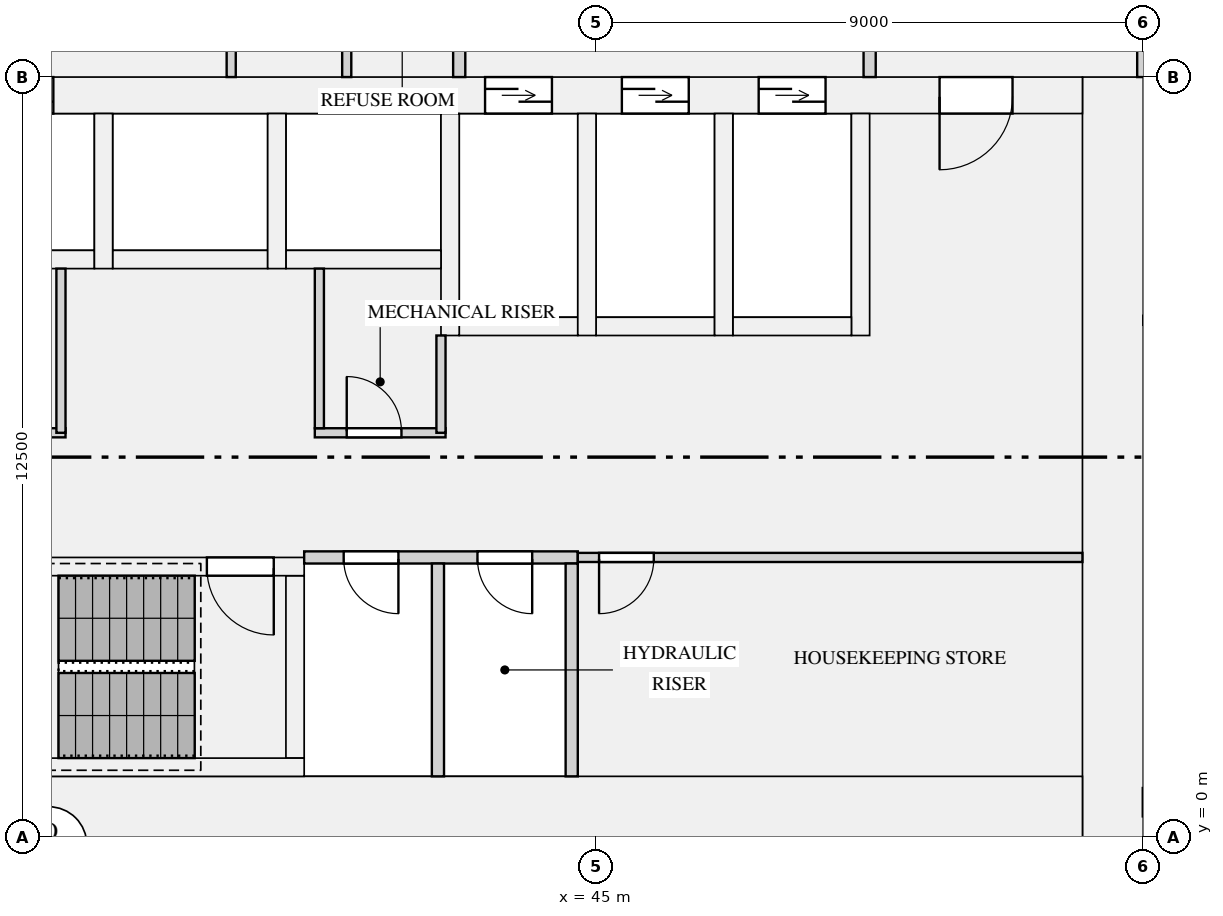
"""IFC4 building model, lengths in metres.
Left out: names, types, materials, properties, quantities, classifications, styles, units other than length and angle.
Written with IfcOpenShell. Run it as: python <this file> out.ifc"""

import sys

from ifc_helpers import new_model, si_unit, direction, frame, frame_2d, origin, place, context, subcontext, project, spatial, rectangle, extrude, element, fill, save


model = new_model("IFC4")
c1 = context("Model", 3, precision=1e-05, world=origin(), true_north=direction((0.0, 1.0)))
c2 = subcontext(c1, "Body", "Model", "MODEL_VIEW")
j1 = project(units=[si_unit("LENGTHUNIT", "METRE"), si_unit("PLANEANGLEUNIT", "RADIAN")], contexts=[c1])
p1 = place(None, origin())
s1 = spatial("IfcSite", under=j1, at=p1, CompositionType="ELEMENT")
p2 = place(p1, origin())
s2 = spatial("IfcBuilding", under=s1, at=p2, CompositionType="ELEMENT")
p3 = place(p2, frame((0.0, 0.0, 54.15)))
s3 = spatial("IfcBuildingStorey", under=s2, at=p3, CompositionType="ELEMENT", Elevation=54.15)
p4 = place(p3, frame((53.5, 0.0, 0.0), z_axis=(0.0, 0.0, 1.0), x_axis=(0.0, 1.0, 0.0)))
e1 = element("IfcWall", 1, at=p4, inside=s3, PredefinedType="SHEAR", context=c2, shape_type="SweptSolid", body=[
    extrude(rectangle(XDim=12.5, YDim=1.0, at=frame_2d((6.25, 0.0))), origin(), (0.0, 0.0, 1.0), 3.15),
])
p5 = place(p3, frame((19.0, 0.5, 0.0), z_axis=(0.0, 0.0, 1.0), x_axis=(1.0, 0.0, 0.0)))
e2 = element("IfcWall", 2, at=p5, inside=s3, PredefinedType="SHEAR", context=c2, shape_type="SweptSolid", body=[
    extrude(rectangle(XDim=34.0, YDim=1.0, at=frame_2d((17.0, 0.0))), origin(), (0.0, 0.0, 1.0), 3.15),
])
p6 = place(p3, frame((19.0, 12.2, 0.0), z_axis=(0.0, 0.0, 1.0), x_axis=(1.0, 0.0, 0.0)))
e3 = element("IfcWall", 3, at=p6, inside=s3, PredefinedType="SHEAR", context=c2, shape_type="SweptSolid", body=[
    extrude(rectangle(XDim=34.0, YDim=0.6, at=frame_2d((17.0, 0.0))), origin(), (0.0, 0.0, 1.0), 3.15),
])
p7 = place(p6, frame((4.475, 0.0, 0.0)))
e4 = element("IfcOpeningElement", 4, at=p7, cuts=e3, PredefinedType="OPENING", context=c2, shape_type="SweptSolid", body=[
    extrude(rectangle(XDim=1.2, YDim=2.1, at=frame_2d((0.6, 1.05))), frame((0.0, 0.31, 0.0), z_axis=(0.0, -1.0, 0.0), x_axis=(1.0, 0.0, 0.0)), (0.0, 0.0, 1.0), 0.62),
])
p8 = place(p6, frame((7.325, 0.0, 0.0)))
e5 = element("IfcOpeningElement", 5, at=p8, cuts=e3, PredefinedType="OPENING", context=c2, shape_type="SweptSolid", body=[
    extrude(rectangle(XDim=1.2, YDim=2.1, at=frame_2d((0.6, 1.05))), frame((0.0, 0.31, 0.0), z_axis=(0.0, -1.0, 0.0), x_axis=(1.0, 0.0, 0.0)), (0.0, 0.0, 1.0), 0.62),
])
p9 = place(p6, frame((10.175, 0.0, 0.0)))
e6 = element("IfcOpeningElement", 6, at=p9, cuts=e3, PredefinedType="OPENING", context=c2, shape_type="SweptSolid", body=[
    extrude(rectangle(XDim=1.2, YDim=2.1, at=frame_2d((0.6, 1.05))), frame((0.0, 0.31, 0.0), z_axis=(0.0, -1.0, 0.0), x_axis=(1.0, 0.0, 0.0)), (0.0, 0.0, 1.0), 0.62),
])
p10 = place(p6, frame((13.025, 0.0, 0.0)))
e7 = element("IfcOpeningElement", 7, at=p10, cuts=e3, PredefinedType="OPENING", context=c2, shape_type="SweptSolid", body=[
    extrude(rectangle(XDim=1.2, YDim=2.1, at=frame_2d((0.6, 1.05))), frame((0.0, 0.31, 0.0), z_axis=(0.0, -1.0, 0.0), x_axis=(1.0, 0.0, 0.0)), (0.0, 0.0, 1.0), 0.62),
])
p11 = place(p6, frame((15.875, 0.0, 0.0)))
e8 = element("IfcOpeningElement", 8, at=p11, cuts=e3, PredefinedType="OPENING", context=c2, shape_type="SweptSolid", body=[
    extrude(rectangle(XDim=1.2, YDim=2.1, at=frame_2d((0.6, 1.05))), frame((0.0, 0.31, 0.0), z_axis=(0.0, -1.0, 0.0), x_axis=(1.0, 0.0, 0.0)), (0.0, 0.0, 1.0), 0.62),
])
p12 = place(p6, frame((24.175, 0.0, 0.0)))
e9 = element("IfcOpeningElement", 9, at=p12, cuts=e3, PredefinedType="OPENING", context=c2, shape_type="SweptSolid", body=[
    extrude(rectangle(XDim=1.1, YDim=2.1, at=frame_2d((0.55, 1.05))), frame((0.0, 0.31, 0.0), z_axis=(0.0, -1.0, 0.0), x_axis=(1.0, 0.0, 0.0)), (0.0, 0.0, 1.0), 0.62),
])
p13 = place(p6, frame((26.425, 0.0, 0.0)))
e10 = element("IfcOpeningElement", 10, at=p13, cuts=e3, PredefinedType="OPENING", context=c2, shape_type="SweptSolid", body=[
    extrude(rectangle(XDim=1.1, YDim=2.1, at=frame_2d((0.55, 1.05))), frame((0.0, 0.31, 0.0), z_axis=(0.0, -1.0, 0.0), x_axis=(1.0, 0.0, 0.0)), (0.0, 0.0, 1.0), 0.62),
])
p14 = place(p6, frame((28.675, 0.0, 0.0)))
e11 = element("IfcOpeningElement", 11, at=p14, cuts=e3, PredefinedType="OPENING", context=c2, shape_type="SweptSolid", body=[
    extrude(rectangle(XDim=1.1, YDim=2.1, at=frame_2d((0.55, 1.05))), frame((0.0, 0.31, 0.0), z_axis=(0.0, -1.0, 0.0), x_axis=(1.0, 0.0, 0.0)), (0.0, 0.0, 1.0), 0.62),
])
p15 = place(p6, frame((1.15, 0.0, 0.0)))
e12 = element("IfcOpeningElement", 12, at=p15, cuts=e3, PredefinedType="OPENING", context=c2, shape_type="SweptSolid", body=[
    extrude(rectangle(XDim=1.2, YDim=2.1, at=frame_2d((0.6, 1.05))), frame((0.0, 0.31, 0.0), z_axis=(0.0, -1.0, 0.0), x_axis=(1.0, 0.0, 0.0)), (0.0, 0.0, 1.0), 0.62),
])
p16 = place(p6, frame((31.65, 0.0, 0.0)))
e13 = element("IfcOpeningElement", 13, at=p16, cuts=e3, PredefinedType="OPENING", context=c2, shape_type="SweptSolid", body=[
    extrude(rectangle(XDim=1.2, YDim=2.1, at=frame_2d((0.6, 1.05))), frame((0.0, 0.31, 0.0), z_axis=(0.0, -1.0, 0.0), x_axis=(1.0, 0.0, 0.0)), (0.0, 0.0, 1.0), 0.62),
])
for number, where, z_axis, x_axis in (
    (14, (34.2, 9.5, 0.0), (0.0, 0.0, 1.0), (1.0, 0.0, 0.0)),
    (15, (37.05, 9.5, 0.0), (0.0, 0.0, 1.0), (1.0, 0.0, 0.0)),
):
    element("IfcWall", number, at=place(p3, frame(where, z_axis=z_axis, x_axis=x_axis)), inside=s3, PredefinedType="SHEAR", context=c2, shape_type="SweptSolid", body=[
        extrude(rectangle(XDim=2.55, YDim=0.3, at=frame_2d((1.275, 0.0))), origin(), (0.0, 0.0, 1.0), 3.15),
    ])
p17 = place(p3, frame((36.9, 9.35, 0.0), z_axis=(0.0, 0.0, 1.0), x_axis=(0.0, 1.0, 0.0)))
e16 = element("IfcWall", 16, at=p17, inside=s3, PredefinedType="SHEAR", context=c2, shape_type="SweptSolid", body=[
    extrude(rectangle(XDim=2.55, YDim=0.3, at=frame_2d((1.275, 0.0))), origin(), (0.0, 0.0, 1.0), 3.15),
])
p18 = place(p3, frame((39.9, 9.5, 0.0), z_axis=(0.0, 0.0, 1.0), x_axis=(1.0, 0.0, 0.0)))
e17 = element("IfcWall", 17, at=p18, inside=s3, PredefinedType="SHEAR", context=c2, shape_type="SweptSolid", body=[
    extrude(rectangle(XDim=2.55, YDim=0.3, at=frame_2d((1.275, 0.0))), origin(), (0.0, 0.0, 1.0), 3.15),
])
p19 = place(p3, frame((39.75, 9.35, 0.0), z_axis=(0.0, 0.0, 1.0), x_axis=(0.0, 1.0, 0.0)))
e18 = element("IfcWall", 18, at=p19, inside=s3, PredefinedType="SHEAR", context=c2, shape_type="SweptSolid", body=[
    extrude(rectangle(XDim=2.55, YDim=0.3, at=frame_2d((1.275, 0.0))), origin(), (0.0, 0.0, 1.0), 3.15),
])
p20 = place(p3, frame((42.75, 8.4, 0.0), z_axis=(0.0, 0.0, 1.0), x_axis=(1.0, 0.0, 0.0)))
e19 = element("IfcWall", 19, at=p20, inside=s3, PredefinedType="SHEAR", context=c2, shape_type="SweptSolid", body=[
    extrude(rectangle(XDim=1.95, YDim=0.3, at=frame_2d((0.975, 0.0))), origin(), (0.0, 0.0, 1.0), 3.15),
])
p21 = place(p3, frame((42.6, 8.25, 0.0), z_axis=(0.0, 0.0, 1.0), x_axis=(0.0, 1.0, 0.0)))
e20 = element("IfcWall", 20, at=p21, inside=s3, PredefinedType="SHEAR", context=c2, shape_type="SweptSolid", body=[
    extrude(rectangle(XDim=3.65, YDim=0.3, at=frame_2d((1.825, 0.0))), origin(), (0.0, 0.0, 1.0), 3.15),
])
p22 = place(p3, frame((45.0, 8.4, 0.0), z_axis=(0.0, 0.0, 1.0), x_axis=(1.0, 0.0, 0.0)))
e21 = element("IfcWall", 21, at=p22, inside=s3, PredefinedType="SHEAR", context=c2, shape_type="SweptSolid", body=[
    extrude(rectangle(XDim=1.95, YDim=0.3, at=frame_2d((0.975, 0.0))), origin(), (0.0, 0.0, 1.0), 3.15),
])
p23 = place(p3, frame((44.85, 8.25, 0.0), z_axis=(0.0, 0.0, 1.0), x_axis=(0.0, 1.0, 0.0)))
e22 = element("IfcWall", 22, at=p23, inside=s3, PredefinedType="SHEAR", context=c2, shape_type="SweptSolid", body=[
    extrude(rectangle(XDim=3.65, YDim=0.3, at=frame_2d((1.825, 0.0))), origin(), (0.0, 0.0, 1.0), 3.15),
])
p24 = place(p3, frame((47.25, 8.4, 0.0), z_axis=(0.0, 0.0, 1.0), x_axis=(1.0, 0.0, 0.0)))
e23 = element("IfcWall", 23, at=p24, inside=s3, PredefinedType="SHEAR", context=c2, shape_type="SweptSolid", body=[
    extrude(rectangle(XDim=1.95, YDim=0.3, at=frame_2d((0.975, 0.0))), origin(), (0.0, 0.0, 1.0), 3.15),
])
for number, where, z_axis, x_axis in (
    (24, (47.1, 8.25, 0.0), (0.0, 0.0, 1.0), (0.0, 1.0, 0.0)),
    (25, (49.35, 8.25, 0.0), (0.0, 0.0, 1.0), (0.0, 1.0, 0.0)),
):
    element("IfcWall", number, at=place(p3, frame(where, z_axis=z_axis, x_axis=x_axis)), inside=s3, PredefinedType="SHEAR", context=c2, shape_type="SweptSolid", body=[
        extrude(rectangle(XDim=3.65, YDim=0.3, at=frame_2d((1.825, 0.0))), origin(), (0.0, 0.0, 1.0), 3.15),
    ])
p25 = place(p3, frame((31.8, 1.15, 0.0), z_axis=(0.0, 0.0, 1.0), x_axis=(1.0, 0.0, 0.0)))
e26 = element("IfcWall", 26, at=p25, inside=s3, PredefinedType="SHEAR", context=c2, shape_type="SweptSolid", body=[
    extrude(rectangle(XDim=8.4, YDim=0.3, at=frame_2d((4.2, 0.0))), origin(), (0.0, 0.0, 1.0), 3.15),
])
p26 = place(p3, frame((31.8, 4.45, 0.0), z_axis=(0.0, 0.0, 1.0), x_axis=(1.0, 0.0, 0.0)))
e27 = element("IfcWall", 27, at=p26, inside=s3, PredefinedType="SHEAR", context=c2, shape_type="SweptSolid", body=[
    extrude(rectangle(XDim=8.4, YDim=0.3, at=frame_2d((4.2, 0.0))), origin(), (0.0, 0.0, 1.0), 3.15),
])
p27 = place(p26, frame((6.8, 0.0, 0.0)))
e28 = element("IfcOpeningElement", 28, at=p27, cuts=e27, PredefinedType="OPENING", context=c2, shape_type="SweptSolid", body=[
    extrude(rectangle(XDim=1.1, YDim=2.1, at=frame_2d((0.55, 1.05))), frame((0.0, 0.16, 0.0), z_axis=(0.0, -1.0, 0.0), x_axis=(1.0, 0.0, 0.0)), (0.0, 0.0, 1.0), 0.32),
])
p28 = place(p3, frame((40.05, 1.3, 0.0), z_axis=(0.0, 0.0, 1.0), x_axis=(0.0, 1.0, 0.0)))
e29 = element("IfcWall", 29, at=p28, inside=s3, PredefinedType="SHEAR", context=c2, shape_type="SweptSolid", body=[
    extrude(rectangle(XDim=3.0, YDim=0.3, at=frame_2d((1.5, 0.0))), origin(), (0.0, 0.0, 1.0), 3.15),
])
p29 = place(p3, frame((40.2, 4.6, 0.0), z_axis=(0.0, 0.0, 1.0), x_axis=(1.0, 0.0, 0.0)))
e30 = element("IfcWall", 30, at=p29, inside=s3, PredefinedType="PARTITIONING", context=c2, shape_type="SweptSolid", body=[
    extrude(rectangle(XDim=4.5, YDim=0.2, at=frame_2d((2.25, 0.0))), origin(), (0.0, 0.0, 1.0), 2.83),
])
p30 = place(p29, frame((0.65, 0.0, 0.0)))
e31 = element("IfcOpeningElement", 31, at=p30, cuts=e30, PredefinedType="OPENING", context=c2, shape_type="SweptSolid", body=[
    extrude(rectangle(XDim=0.9, YDim=2.1, at=frame_2d((0.45, 1.05))), frame((0.0, 0.11, 0.0), z_axis=(0.0, -1.0, 0.0), x_axis=(1.0, 0.0, 0.0)), (0.0, 0.0, 1.0), 0.22),
])
p31 = place(p29, frame((2.85, 0.0, 0.0)))
e32 = element("IfcOpeningElement", 32, at=p31, cuts=e30, PredefinedType="OPENING", context=c2, shape_type="SweptSolid", body=[
    extrude(rectangle(XDim=0.9, YDim=2.1, at=frame_2d((0.45, 1.05))), frame((0.0, 0.11, 0.0), z_axis=(0.0, -1.0, 0.0), x_axis=(1.0, 0.0, 0.0)), (0.0, 0.0, 1.0), 0.22),
])
p32 = place(p3, frame((44.7, 4.6, 0.0), z_axis=(0.0, 0.0, 1.0), x_axis=(1.0, 0.0, 0.0)))
e33 = element("IfcWall", 33, at=p32, inside=s3, PredefinedType="PARTITIONING", context=c2, shape_type="SweptSolid", body=[
    extrude(rectangle(XDim=8.3, YDim=0.15, at=frame_2d((4.15, 0.0))), origin(), (0.0, 0.0, 1.0), 2.83),
])
p33 = place(p32, frame((0.35, 0.0, 0.0)))
e34 = element("IfcOpeningElement", 34, at=p33, cuts=e33, PredefinedType="OPENING", context=c2, shape_type="SweptSolid", body=[
    extrude(rectangle(XDim=0.9, YDim=2.1, at=frame_2d((0.45, 1.05))), frame((0.0, 0.085, 0.0), z_axis=(0.0, -1.0, 0.0), x_axis=(1.0, 0.0, 0.0)), (0.0, 0.0, 1.0), 0.17),
])
p34 = place(p3, frame((27.625, 6.65, 0.0), z_axis=(0.0, 0.0, 1.0), x_axis=(1.0, 0.0, 0.0)))
e35 = element("IfcWall", 35, at=p34, inside=s3, PredefinedType="PARTITIONING", context=c2, shape_type="SweptSolid", body=[
    extrude(rectangle(XDim=8.65, YDim=0.15, at=frame_2d((4.325, 0.0))), origin(), (0.0, 0.0, 1.0), 2.83),
])
p35 = place(p34, frame((0.525, 0.0, 0.0)))
e36 = element("IfcOpeningElement", 36, at=p35, cuts=e35, PredefinedType="OPENING", context=c2, shape_type="SweptSolid", body=[
    extrude(rectangle(XDim=0.9, YDim=2.1, at=frame_2d((0.45, 1.05))), frame((0.0, 0.085, 0.0), z_axis=(0.0, -1.0, 0.0), x_axis=(1.0, 0.0, 0.0)), (0.0, 0.0, 1.0), 0.17),
])
p36 = place(p34, frame((5.525, 0.0, 0.0)))
e37 = element("IfcOpeningElement", 37, at=p36, cuts=e35, PredefinedType="OPENING", context=c2, shape_type="SweptSolid", body=[
    extrude(rectangle(XDim=0.9, YDim=2.1, at=frame_2d((0.45, 1.05))), frame((0.0, 0.085, 0.0), z_axis=(0.0, -1.0, 0.0), x_axis=(1.0, 0.0, 0.0)), (0.0, 0.0, 1.0), 0.17),
])
p37 = place(p3, frame((40.375, 6.65, 0.0), z_axis=(0.0, 0.0, 1.0), x_axis=(1.0, 0.0, 0.0)))
e38 = element("IfcWall", 38, at=p37, inside=s3, PredefinedType="PARTITIONING", context=c2, shape_type="SweptSolid", body=[
    extrude(rectangle(XDim=2.15, YDim=0.15, at=frame_2d((1.075, 0.0))), origin(), (0.0, 0.0, 1.0), 2.83),
])
p38 = place(p37, frame((0.525, 0.0, 0.0)))
e39 = element("IfcOpeningElement", 39, at=p38, cuts=e38, PredefinedType="OPENING", context=c2, shape_type="SweptSolid", body=[
    extrude(rectangle(XDim=0.9, YDim=2.1, at=frame_2d((0.45, 1.05))), frame((0.0, 0.085, 0.0), z_axis=(0.0, -1.0, 0.0), x_axis=(1.0, 0.0, 0.0)), (0.0, 0.0, 1.0), 0.17),
])
for number, where, z_axis, x_axis in (
    (40, (42.4, 1.0, 0.0), (0.0, 0.0, 1.0), (0.0, 1.0, 0.0)),
    (41, (44.6, 1.0, 0.0), (0.0, 0.0, 1.0), (0.0, 1.0, 0.0)),
):
    element("IfcWall", number, at=place(p3, frame(where, z_axis=z_axis, x_axis=x_axis)), inside=s3, PredefinedType="PARTITIONING", context=c2, shape_type="SweptSolid", body=[
        extrude(rectangle(XDim=3.5, YDim=0.2, at=frame_2d((1.75, 0.0))), origin(), (0.0, 0.0, 1.0), 2.83),
    ])
p39 = place(p3, frame((36.2, 6.65, 0.0), z_axis=(0.0, 0.0, 1.0), x_axis=(0.0, 1.0, 0.0)))
e42 = element("IfcWall", 42, at=p39, inside=s3, PredefinedType="PARTITIONING", context=c2, shape_type="SweptSolid", body=[
    extrude(rectangle(XDim=2.7, YDim=0.15, at=frame_2d((1.35, 0.0))), origin(), (0.0, 0.0, 1.0), 2.83),
])
p40 = place(p3, frame((42.45, 6.65, 0.0), z_axis=(0.0, 0.0, 1.0), x_axis=(0.0, 1.0, 0.0)))
e43 = element("IfcWall", 43, at=p40, inside=s3, PredefinedType="PARTITIONING", context=c2, shape_type="SweptSolid", body=[
    extrude(rectangle(XDim=1.6, YDim=0.15, at=frame_2d((0.8, 0.0))), origin(), (0.0, 0.0, 1.0), 2.83),
])
p41 = place(p3, frame((40.45, 6.725, 0.0), z_axis=(0.0, 0.0, 1.0), x_axis=(0.0, 1.0, 0.0)))
e44 = element("IfcWall", 44, at=p41, inside=s3, PredefinedType="PARTITIONING", context=c2, shape_type="SweptSolid", body=[
    extrude(rectangle(XDim=2.625, YDim=0.15, at=frame_2d((1.312, 0.0))), origin(), (0.0, 0.0, 1.0), 2.83),
])
for number, where, z_axis, x_axis in (
    (45, (39.0, 12.5, 0.0), (0.0, 0.0, 1.0), (0.0, 1.0, 0.0)),
    (46, (40.9, 12.5, 0.0), (0.0, 0.0, 1.0), (0.0, 1.0, 0.0)),
):
    element("IfcWall", number, at=place(p3, frame(where, z_axis=z_axis, x_axis=x_axis)), inside=s3, PredefinedType="PARTITIONING", context=c2, shape_type="SweptSolid", body=[
        extrude(rectangle(XDim=1.925, YDim=0.15, at=frame_2d((0.962, 0.0))), origin(), (0.0, 0.0, 1.0), 2.83),
    ])
p42 = place(p3, frame((42.75, 12.5, 0.0), z_axis=(0.0, 0.0, 1.0), x_axis=(0.0, 1.0, 0.0)))
e47 = element("IfcWall", 47, at=p42, inside=s3, PredefinedType="PARTITIONING", context=c2, shape_type="SweptSolid", body=[
    extrude(rectangle(XDim=1.925, YDim=0.2, at=frame_2d((0.962, 0.0))), origin(), (0.0, 0.0, 1.0), 2.83),
])
p43 = place(p3, frame((49.5, 12.5, 0.0), z_axis=(0.0, 0.0, 1.0), x_axis=(0.0, 1.0, 0.0)))
e48 = element("IfcWall", 48, at=p43, inside=s3, PredefinedType="PARTITIONING", context=c2, shape_type="SweptSolid", body=[
    extrude(rectangle(XDim=3.4, YDim=0.2, at=frame_2d((1.7, 0.0))), origin(), (0.0, 0.0, 1.0), 2.83),
])
p44 = place(p43, frame((1.15, 0.0, 0.0)))
e49 = element("IfcOpeningElement", 49, at=p44, cuts=e48, PredefinedType="OPENING", context=c2, shape_type="SweptSolid", body=[
    extrude(rectangle(XDim=1.1, YDim=2.1, at=frame_2d((0.55, 1.05))), frame((0.0, 0.11, 0.0), z_axis=(0.0, -1.0, 0.0), x_axis=(1.0, 0.0, 0.0)), (0.0, 0.0, 1.0), 0.22),
])
p45 = place(p3, frame((54.0, 12.5, 0.0), z_axis=(0.0, 0.0, 1.0), x_axis=(0.0, 1.0, 0.0)))
e50 = element("IfcWall", 50, at=p45, inside=s3, PredefinedType="PARTITIONING", context=c2, shape_type="SweptSolid", body=[
    extrude(rectangle(XDim=3.4, YDim=0.2, at=frame_2d((1.7, 0.0))), origin(), (0.0, 0.0, 1.0), 2.83),
])
p46 = place(p11, origin())
e51 = element("IfcDoor", 51, at=p46, inside=s3, OperationType="DOUBLE_DOOR_SLIDING", PredefinedType="DOOR", context=c2, shape_type="SweptSolid", body=[
    extrude(rectangle(XDim=1.2, YDim=2.1, at=frame_2d((0.6, 1.05))), frame((0.0, 0.025, 0.0), z_axis=(0.0, -1.0, 0.0), x_axis=(1.0, 0.0, 0.0)), (0.0, 0.0, 1.0), 0.05),
])
fill(e8, e51)
p47 = place(p12, origin())
e52 = element("IfcDoor", 52, at=p47, inside=s3, OperationType="DOUBLE_DOOR_SLIDING", PredefinedType="DOOR", context=c2, shape_type="SweptSolid", body=[
    extrude(rectangle(XDim=1.1, YDim=2.1, at=frame_2d((0.55, 1.05))), frame((0.0, 0.025, 0.0), z_axis=(0.0, -1.0, 0.0), x_axis=(1.0, 0.0, 0.0)), (0.0, 0.0, 1.0), 0.05),
])
fill(e9, e52)
p48 = place(p13, origin())
e53 = element("IfcDoor", 53, at=p48, inside=s3, OperationType="DOUBLE_DOOR_SLIDING", PredefinedType="DOOR", context=c2, shape_type="SweptSolid", body=[
    extrude(rectangle(XDim=1.1, YDim=2.1, at=frame_2d((0.55, 1.05))), frame((0.0, 0.025, 0.0), z_axis=(0.0, -1.0, 0.0), x_axis=(1.0, 0.0, 0.0)), (0.0, 0.0, 1.0), 0.05),
])
fill(e10, e53)
p49 = place(p14, origin())
e54 = element("IfcDoor", 54, at=p49, inside=s3, OperationType="DOUBLE_DOOR_SLIDING", PredefinedType="DOOR", context=c2, shape_type="SweptSolid", body=[
    extrude(rectangle(XDim=1.1, YDim=2.1, at=frame_2d((0.55, 1.05))), frame((0.0, 0.025, 0.0), z_axis=(0.0, -1.0, 0.0), x_axis=(1.0, 0.0, 0.0)), (0.0, 0.0, 1.0), 0.05),
])
fill(e11, e54)
p50 = place(p27, frame((1.1, 0.0, 0.0), z_axis=(0.0, 0.0, 1.0), x_axis=(-1.0, 0.0, 0.0)))
e55 = element("IfcDoor", 55, at=p50, inside=s3, OperationType="SINGLE_SWING_LEFT", PredefinedType="DOOR", context=c2, shape_type="SweptSolid", body=[
    extrude(rectangle(XDim=1.1, YDim=2.1, at=frame_2d((0.55, 1.05))), frame((0.0, 0.025, 0.0), z_axis=(0.0, -1.0, 0.0), x_axis=(1.0, 0.0, 0.0)), (0.0, 0.0, 1.0), 0.05),
])
fill(e28, e55)
p51 = place(p38, origin())
e56 = element("IfcDoor", 56, at=p51, inside=s3, OperationType="SINGLE_SWING_LEFT", PredefinedType="DOOR", context=c2, shape_type="SweptSolid", body=[
    extrude(rectangle(XDim=0.9, YDim=2.1, at=frame_2d((0.45, 1.05))), frame((0.0, 0.025, 0.0), z_axis=(0.0, -1.0, 0.0), x_axis=(1.0, 0.0, 0.0)), (0.0, 0.0, 1.0), 0.05),
])
fill(e39, e56)
p52 = place(p33, frame((0.9, 0.0, 0.0), z_axis=(0.0, 0.0, 1.0), x_axis=(-1.0, 0.0, 0.0)))
e57 = element("IfcDoor", 57, at=p52, inside=s3, OperationType="SINGLE_SWING_RIGHT", PredefinedType="DOOR", context=c2, shape_type="SweptSolid", body=[
    extrude(rectangle(XDim=0.9, YDim=2.1, at=frame_2d((0.45, 1.05))), frame((0.0, 0.025, 0.0), z_axis=(0.0, -1.0, 0.0), x_axis=(1.0, 0.0, 0.0)), (0.0, 0.0, 1.0), 0.05),
])
fill(e34, e57)
p53 = place(p30, frame((0.9, 0.0, 0.0), z_axis=(0.0, 0.0, 1.0), x_axis=(-1.0, 0.0, 0.0)))
e58 = element("IfcDoor", 58, at=p53, inside=s3, OperationType="SINGLE_SWING_LEFT", PredefinedType="DOOR", context=c2, shape_type="SweptSolid", body=[
    extrude(rectangle(XDim=0.9, YDim=2.1, at=frame_2d((0.45, 1.05))), frame((0.0, 0.025, 0.0), z_axis=(0.0, -1.0, 0.0), x_axis=(1.0, 0.0, 0.0)), (0.0, 0.0, 1.0), 0.05),
])
fill(e31, e58)
p54 = place(p31, frame((0.9, 0.0, 0.0), z_axis=(0.0, 0.0, 1.0), x_axis=(-1.0, 0.0, 0.0)))
e59 = element("IfcDoor", 59, at=p54, inside=s3, OperationType="SINGLE_SWING_LEFT", PredefinedType="DOOR", context=c2, shape_type="SweptSolid", body=[
    extrude(rectangle(XDim=0.9, YDim=2.1, at=frame_2d((0.45, 1.05))), frame((0.0, 0.025, 0.0), z_axis=(0.0, -1.0, 0.0), x_axis=(1.0, 0.0, 0.0)), (0.0, 0.0, 1.0), 0.05),
])
fill(e32, e59)
p55 = place(p16, frame((1.2, 0.0, 0.0), z_axis=(0.0, 0.0, 1.0), x_axis=(-1.0, 0.0, 0.0)))
e60 = element("IfcDoor", 60, at=p55, inside=s3, OperationType="SINGLE_SWING_RIGHT", PredefinedType="DOOR", context=c2, shape_type="SweptSolid", body=[
    extrude(rectangle(XDim=1.2, YDim=2.1, at=frame_2d((0.6, 1.05))), frame((0.0, 0.025, 0.0), z_axis=(0.0, -1.0, 0.0), x_axis=(1.0, 0.0, 0.0)), (0.0, 0.0, 1.0), 0.05),
])
fill(e13, e60)
save(model, sys.argv[1])
